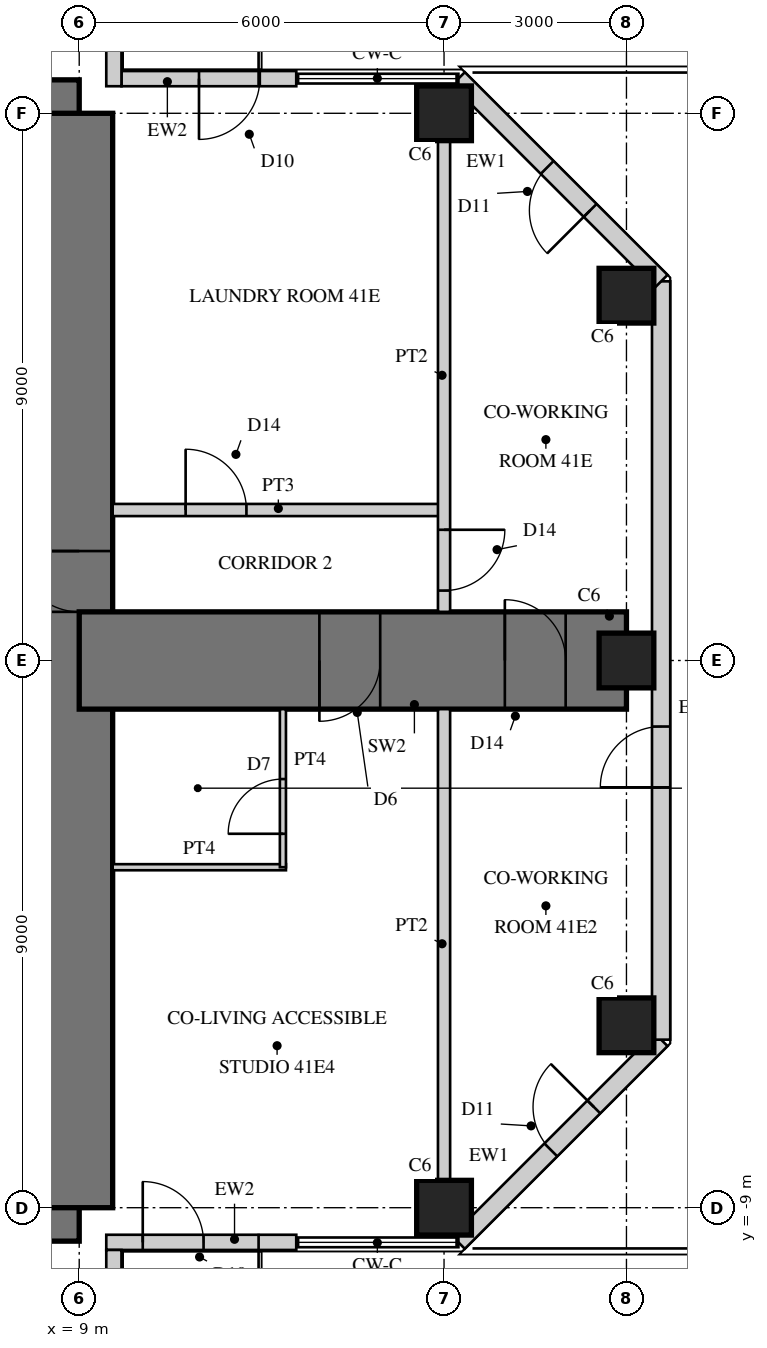
"""IFC4 building model, lengths in metres.
Left out: names, types, materials, properties, quantities, classifications, styles, units other than length and angle.
Written with IfcOpenShell. Run it as: python <this file> out.ifc"""

import sys

from ifc_helpers import new_model, si_unit, direction, frame, frame_2d, origin, origin_2d, place, context, subcontext, project, spatial, rectangle, hollow_rectangle, extrude, element, fill, save


model = new_model("IFC4")
c1 = context("Model", 3, precision=1e-05, world=origin(), true_north=direction((0.0, 1.0)))
c2 = subcontext(c1, "Body", "Model", "MODEL_VIEW")
j1 = project(units=[si_unit("LENGTHUNIT", "METRE"), si_unit("PLANEANGLEUNIT", "RADIAN")], contexts=[c1])
p1 = place(None, origin())
s1 = spatial("IfcSite", under=j1, at=p1, CompositionType="ELEMENT")
p2 = place(p1, origin())
s2 = spatial("IfcBuilding", under=s1, at=p2, CompositionType="ELEMENT")
p3 = place(p2, frame((0.0, 0.0, 169.5)))
s3 = spatial("IfcBuildingStorey", under=s2, at=p3, CompositionType="ELEMENT", Elevation=169.5)
p4 = place(p3, frame((9.0, 9.0, 0.0), z_axis=(0.0, 0.0, 1.0), x_axis=(-1.0, 0.0, 0.0)))
e1 = element("IfcWall", 1, at=p4, inside=s3, PredefinedType="SHEAR", context=c2, shape_type="SweptSolid", body=[
    extrude(rectangle(XDim=18.0, YDim=1.1, at=frame_2d((9.0, 0.0))), origin(), (0.0, 0.0, 1.0), 3.4),
])
p5 = place(p4, frame((9.8, 0.0, 0.0)))
e2 = element("IfcOpeningElement", 2, at=p5, cuts=e1, PredefinedType="OPENING", context=c2, shape_type="SweptSolid", body=[
    extrude(rectangle(XDim=1.0, YDim=2.4, at=frame_2d((0.5, 1.2))), frame((0.0, 0.56, 0.0), z_axis=(0.0, -1.0, 0.0), x_axis=(1.0, 0.0, 0.0)), (0.0, 0.0, 1.0), 1.12),
])
p6 = place(p3, frame((-9.0, -9.0, 0.0), z_axis=(0.0, 0.0, 1.0), x_axis=(1.0, 0.0, 0.0)))
e3 = element("IfcWall", 3, at=p6, inside=s3, PredefinedType="SHEAR", context=c2, shape_type="SweptSolid", body=[
    extrude(rectangle(XDim=18.0, YDim=1.1, at=frame_2d((9.0, 0.0))), origin(), (0.0, 0.0, 1.0), 3.4),
])
p7 = place(p6, frame((9.8, 0.0, 0.0)))
e4 = element("IfcOpeningElement", 4, at=p7, cuts=e3, PredefinedType="OPENING", context=c2, shape_type="SweptSolid", body=[
    extrude(rectangle(XDim=1.0, YDim=2.4, at=frame_2d((0.5, 1.2))), frame((0.0, 0.56, 0.0), z_axis=(0.0, -1.0, 0.0), x_axis=(1.0, 0.0, 0.0)), (0.0, 0.0, 1.0), 1.12),
])
p8 = place(p3, frame((9.0, -9.0, 0.0), z_axis=(0.0, 0.0, 1.0), x_axis=(0.0, 1.0, 0.0)))
e5 = element("IfcWall", 5, at=p8, inside=s3, PredefinedType="SHEAR", context=c2, shape_type="SweptSolid", body=[
    extrude(rectangle(XDim=18.0, YDim=1.1, at=frame_2d((9.0, 0.0))), origin(), (0.0, 0.0, 1.0), 3.4),
])
p9 = place(p8, frame((9.8, 0.0, 0.0)))
e6 = element("IfcOpeningElement", 6, at=p9, cuts=e5, PredefinedType="OPENING", context=c2, shape_type="SweptSolid", body=[
    extrude(rectangle(XDim=1.0, YDim=2.4, at=frame_2d((0.5, 1.2))), frame((0.0, 0.56, 0.0), z_axis=(0.0, -1.0, 0.0), x_axis=(1.0, 0.0, 0.0)), (0.0, 0.0, 1.0), 1.12),
])
p10 = place(p3, frame((9.0, 0.0, 0.0), z_axis=(0.0, 0.0, 1.0), x_axis=(1.0, 0.0, 0.0)))
e7 = element("IfcWall", 7, at=p10, inside=s3, PredefinedType="SHEAR", context=c2, shape_type="SweptSolid", body=[
    extrude(rectangle(XDim=9.0, YDim=1.6, at=frame_2d((4.5, 0.0))), origin(), (0.0, 0.0, 1.0), 3.4),
])
p11 = place(p10, frame((3.95, 0.0, 0.0)))
e8 = element("IfcOpeningElement", 8, at=p11, cuts=e7, PredefinedType="OPENING", context=c2, shape_type="SweptSolid", body=[
    extrude(rectangle(XDim=1.0, YDim=2.15, at=frame_2d((0.5, 1.075))), frame((0.0, 0.81, 0.0), z_axis=(0.0, -1.0, 0.0), x_axis=(1.0, 0.0, 0.0)), (0.0, 0.0, 1.0), 1.62),
])
p12 = place(p10, frame((7.0, 0.0, 0.0)))
e9 = element("IfcOpeningElement", 9, at=p12, cuts=e7, PredefinedType="OPENING", context=c2, shape_type="SweptSolid", body=[
    extrude(rectangle(XDim=1.0, YDim=2.2, at=frame_2d((0.5, 1.1))), frame((0.0, 0.81, 0.0), z_axis=(0.0, -1.0, 0.0), x_axis=(1.0, 0.0, 0.0)), (0.0, 0.0, 1.0), 1.62),
])
for number, where, z_axis, x_axis in (
    (10, (15.0, -9.0, 0.0), (0.0, 0.0, 1.0), (1.0, 0.0, 0.0)),
    (11, (15.0, 9.0, 0.0), (0.0, 0.0, 1.0), (1.0, 0.0, 0.0)),
    (12, (18.0, -6.0, 0.0), (0.0, 0.0, 1.0), (1.0, 0.0, 0.0)),
    (13, (18.0, 0.0, 0.0), (0.0, 0.0, 1.0), (1.0, 0.0, 0.0)),
    (14, (18.0, 6.0, 0.0), (0.0, 0.0, 1.0), (1.0, 0.0, 0.0)),
):
    element("IfcColumn", number, at=place(p3, frame(where, z_axis=z_axis, x_axis=x_axis)), inside=s3, PredefinedType="COLUMN", context=c2, shape_type="SweptSolid", body=[
        extrude(rectangle(XDim=0.9, YDim=0.9, at=origin_2d()), origin(), (0.0, 0.0, 1.0), 3.4),
    ])
p13 = place(p3, frame((9.445, -9.57, 0.0), z_axis=(0.0, 0.0, 1.0), x_axis=(1.0, 0.0, 0.0)))
e15 = element("IfcWall", 15, at=p13, inside=s3, PredefinedType="SOLIDWALL", context=c2, shape_type="SweptSolid", body=[
    extrude(rectangle(XDim=3.125, YDim=0.25, at=frame_2d((1.562, 0.0))), origin(), (0.0, 0.0, 1.0), 3.22),
])
p14 = place(p13, frame((0.6, 0.0, 0.0)))
e16 = element("IfcOpeningElement", 16, at=p14, cuts=e15, PredefinedType="OPENING", context=c2, shape_type="SweptSolid", body=[
    extrude(rectangle(XDim=1.0, YDim=2.2, at=frame_2d((0.5, 1.1))), frame((0.0, 0.135, 0.0), z_axis=(0.0, -1.0, 0.0), x_axis=(1.0, 0.0, 0.0)), (0.0, 0.0, 1.0), 0.27),
])
p15 = place(p3, frame((15.236, -9.57, 0.0), z_axis=(0.0, 0.0, 1.0), x_axis=(0.707106781187, 0.707106781187, 0.0)))
e17 = element("IfcWall", 17, at=p15, inside=s3, PredefinedType="SOLIDWALL", context=c2, shape_type="SweptSolid", body=[
    extrude(rectangle(XDim=4.715, YDim=0.3, at=frame_2d((2.357, 0.0))), origin(), (0.0, 0.0, 1.0), 3.22),
])
p16 = place(p15, frame((2.15, 0.0, 0.0)))
e18 = element("IfcOpeningElement", 18, at=p16, cuts=e17, PredefinedType="OPENING", context=c2, shape_type="SweptSolid", body=[
    extrude(rectangle(XDim=1.0, YDim=2.4, at=frame_2d((0.5, 1.2))), frame((0.0, 0.16, 0.0), z_axis=(0.0, -1.0, 0.0), x_axis=(1.0, 0.0, 0.0)), (0.0, 0.0, 1.0), 0.32),
])
p17 = place(p3, frame((18.57, -6.236, 0.0), z_axis=(0.0, 0.0, 1.0), x_axis=(0.0, 1.0, 0.0)))
e19 = element("IfcWall", 19, at=p17, inside=s3, PredefinedType="SOLIDWALL", context=c2, shape_type="SweptSolid", body=[
    extrude(rectangle(XDim=12.472, YDim=0.3, at=frame_2d((6.236, 0.0))), origin(), (0.0, 0.0, 1.0), 3.22),
])
p18 = place(p17, frame((4.15, 0.0, 0.0)))
e20 = element("IfcOpeningElement", 20, at=p18, cuts=e19, PredefinedType="OPENING", context=c2, shape_type="SweptSolid", body=[
    extrude(rectangle(XDim=1.0, YDim=2.4, at=frame_2d((0.5, 1.2))), frame((0.0, 0.16, 0.0), z_axis=(0.0, -1.0, 0.0), x_axis=(1.0, 0.0, 0.0)), (0.0, 0.0, 1.0), 0.32),
])
p19 = place(p3, frame((18.57, 6.236, 0.0), z_axis=(0.0, 0.0, 1.0), x_axis=(-0.707106781187, 0.707106781187, 0.0)))
e21 = element("IfcWall", 21, at=p19, inside=s3, PredefinedType="SOLIDWALL", context=c2, shape_type="SweptSolid", body=[
    extrude(rectangle(XDim=4.715, YDim=0.3, at=frame_2d((2.357, 0.0))), origin(), (0.0, 0.0, 1.0), 3.22),
])
p20 = place(p19, frame((1.65, 0.0, 0.0)))
e22 = element("IfcOpeningElement", 22, at=p20, cuts=e21, PredefinedType="OPENING", context=c2, shape_type="SweptSolid", body=[
    extrude(rectangle(XDim=1.0, YDim=2.4, at=frame_2d((0.5, 1.2))), frame((0.0, 0.16, 0.0), z_axis=(0.0, -1.0, 0.0), x_axis=(1.0, 0.0, 0.0)), (0.0, 0.0, 1.0), 0.32),
])
p21 = place(p3, frame((12.57, 9.57, 0.0), z_axis=(0.0, 0.0, 1.0), x_axis=(-1.0, 0.0, 0.0)))
e23 = element("IfcWall", 23, at=p21, inside=s3, PredefinedType="SOLIDWALL", context=c2, shape_type="SweptSolid", body=[
    extrude(rectangle(XDim=2.875, YDim=0.25, at=frame_2d((1.438, 0.0))), origin(), (0.0, 0.0, 1.0), 3.22),
])
p22 = place(p21, frame((0.6, 0.0, 0.0)))
e24 = element("IfcOpeningElement", 24, at=p22, cuts=e23, PredefinedType="OPENING", context=c2, shape_type="SweptSolid", body=[
    extrude(rectangle(XDim=1.0, YDim=2.2, at=frame_2d((0.5, 1.1))), frame((0.0, 0.135, 0.0), z_axis=(0.0, -1.0, 0.0), x_axis=(1.0, 0.0, 0.0)), (0.0, 0.0, 1.0), 0.27),
])
p23 = place(p3, frame((9.57, 9.445, 0.0), z_axis=(0.0, 0.0, 1.0), x_axis=(0.0, 1.0, 0.0)))
e25 = element("IfcWall", 25, at=p23, inside=s3, PredefinedType="SOLIDWALL", context=c2, shape_type="SweptSolid", body=[
    extrude(rectangle(XDim=3.125, YDim=0.25, at=frame_2d((1.562, 0.0))), origin(), (0.0, 0.0, 1.0), 3.22),
])
p24 = place(p23, frame((0.6, 0.0, 0.0)))
e26 = element("IfcOpeningElement", 26, at=p24, cuts=e25, PredefinedType="OPENING", context=c2, shape_type="SweptSolid", body=[
    extrude(rectangle(XDim=1.0, YDim=2.2, at=frame_2d((0.5, 1.1))), frame((0.0, 0.135, 0.0), z_axis=(0.0, -1.0, 0.0), x_axis=(1.0, 0.0, 0.0)), (0.0, 0.0, 1.0), 0.27),
])
p25 = place(p3, frame((9.57, -12.57, 0.0), z_axis=(0.0, 0.0, 1.0), x_axis=(0.0, 1.0, 0.0)))
e27 = element("IfcWall", 27, at=p25, inside=s3, PredefinedType="SOLIDWALL", context=c2, shape_type="SweptSolid", body=[
    extrude(rectangle(XDim=2.875, YDim=0.25, at=frame_2d((1.438, 0.0))), origin(), (0.0, 0.0, 1.0), 3.22),
])
p26 = place(p25, frame((0.6, 0.0, 0.0)))
e28 = element("IfcOpeningElement", 28, at=p26, cuts=e27, PredefinedType="OPENING", context=c2, shape_type="SweptSolid", body=[
    extrude(rectangle(XDim=1.0, YDim=2.2, at=frame_2d((0.5, 1.1))), frame((0.0, 0.135, 0.0), z_axis=(0.0, -1.0, 0.0), x_axis=(1.0, 0.0, 0.0)), (0.0, 0.0, 1.0), 0.27),
])
p27 = place(p3, frame((9.55, -3.4, 0.0), z_axis=(0.0, 0.0, 1.0), x_axis=(1.0, 0.0, 0.0)))
e29 = element("IfcWall", 29, at=p27, inside=s3, PredefinedType="PARTITIONING", context=c2, shape_type="SweptSolid", body=[
    extrude(rectangle(XDim=2.85, YDim=0.1, at=frame_2d((1.425, 0.0))), origin(), (0.0, 0.0, 1.0), 3.22),
])
p28 = place(p3, frame((12.35, -3.4, 0.0), z_axis=(0.0, 0.0, 1.0), x_axis=(0.0, 1.0, 0.0)))
e30 = element("IfcWall", 30, at=p28, inside=s3, PredefinedType="PARTITIONING", context=c2, shape_type="SweptSolid", body=[
    extrude(rectangle(XDim=2.6, YDim=0.1, at=frame_2d((1.3, 0.0))), origin(), (0.0, 0.0, 1.0), 3.22),
])
p29 = place(p28, frame((0.55, 0.0, 0.0)))
e31 = element("IfcOpeningElement", 31, at=p29, cuts=e30, PredefinedType="OPENING", context=c2, shape_type="SweptSolid", body=[
    extrude(rectangle(XDim=0.9, YDim=2.1, at=frame_2d((0.45, 1.05))), frame((0.0, 0.06, 0.0), z_axis=(0.0, -1.0, 0.0), x_axis=(1.0, 0.0, 0.0)), (0.0, 0.0, 1.0), 0.12),
])
p30 = place(p3, frame((9.55, 2.475, 0.0), z_axis=(0.0, 0.0, 1.0), x_axis=(1.0, 0.0, 0.0)))
e32 = element("IfcWall", 32, at=p30, inside=s3, PredefinedType="SOLIDWALL", context=c2, shape_type="SweptSolid", body=[
    extrude(rectangle(XDim=5.45, YDim=0.2, at=frame_2d((2.725, 0.0))), origin(), (0.0, 0.0, 1.0), 3.22),
])
p31 = place(p30, frame((1.2, 0.0, 0.0)))
e33 = element("IfcOpeningElement", 33, at=p31, cuts=e32, PredefinedType="OPENING", context=c2, shape_type="SweptSolid", body=[
    extrude(rectangle(XDim=1.0, YDim=2.2, at=frame_2d((0.5, 1.1))), frame((0.0, 0.11, 0.0), z_axis=(0.0, -1.0, 0.0), x_axis=(1.0, 0.0, 0.0)), (0.0, 0.0, 1.0), 0.22),
])
p32 = place(p3, frame((15.0, -8.55, 0.0), z_axis=(0.0, 0.0, 1.0), x_axis=(0.0, 1.0, 0.0)))
e34 = element("IfcWall", 34, at=p32, inside=s3, PredefinedType="SOLIDWALL", context=c2, shape_type="SweptSolid", body=[
    extrude(rectangle(XDim=7.75, YDim=0.2, at=frame_2d((3.875, 0.0))), origin(), (0.0, 0.0, 1.0), 2.47),
])
p33 = place(p3, frame((15.0, 0.8, 0.0), z_axis=(0.0, 0.0, 1.0), x_axis=(0.0, 1.0, 0.0)))
e35 = element("IfcWall", 35, at=p33, inside=s3, PredefinedType="SOLIDWALL", context=c2, shape_type="SweptSolid", body=[
    extrude(rectangle(XDim=7.75, YDim=0.2, at=frame_2d((3.875, 0.0))), origin(), (0.0, 0.0, 1.0), 2.47),
])
p34 = place(p33, frame((0.35, 0.0, 0.0)))
e36 = element("IfcOpeningElement", 36, at=p34, cuts=e35, PredefinedType="OPENING", context=c2, shape_type="SweptSolid", body=[
    extrude(rectangle(XDim=1.0, YDim=2.2, at=frame_2d((0.5, 1.1))), frame((0.0, 0.11, 0.0), z_axis=(0.0, -1.0, 0.0), x_axis=(1.0, 0.0, 0.0)), (0.0, 0.0, 1.0), 0.22),
])
p35 = place(p14, origin())
e37 = element("IfcDoor", 37, at=p35, inside=s3, OperationType="SINGLE_SWING_LEFT", PredefinedType="DOOR", context=c2, shape_type="SweptSolid", body=[
    extrude(hollow_rectangle(XDim=1.0, YDim=2.2, WallThickness=0.06, at=frame_2d((0.5, 1.1))), frame((0.0, 0.025, 0.0), z_axis=(0.0, -1.0, 0.0), x_axis=(1.0, 0.0, 0.0)), (0.0, 0.0, 1.0), 0.05),
    extrude(rectangle(XDim=0.879, YDim=2.079, at=frame_2d((0.5, 1.1))), frame((0.0, 0.025, 0.0), z_axis=(0.0, -1.0, 0.0), x_axis=(1.0, 0.0, 0.0)), (0.0, 0.0, 1.0), 0.05),
])
fill(e16, e37)
p36 = place(p16, origin())
e38 = element("IfcDoor", 38, at=p36, inside=s3, OperationType="SINGLE_SWING_RIGHT", PredefinedType="DOOR", context=c2, shape_type="SweptSolid", body=[
    extrude(hollow_rectangle(XDim=1.0, YDim=2.4, WallThickness=0.06, at=frame_2d((0.5, 1.2))), frame((0.0, 0.025, 0.0), z_axis=(0.0, -1.0, 0.0), x_axis=(1.0, 0.0, 0.0)), (0.0, 0.0, 1.0), 0.05),
    extrude(rectangle(XDim=0.879, YDim=2.279, at=frame_2d((0.5, 1.2))), frame((0.0, 0.025, 0.0), z_axis=(0.0, -1.0, 0.0), x_axis=(1.0, 0.0, 0.0)), (0.0, 0.0, 1.0), 0.05),
])
fill(e18, e38)
p37 = place(p18, origin())
e39 = element("IfcDoor", 39, at=p37, inside=s3, OperationType="SINGLE_SWING_LEFT", PredefinedType="DOOR", context=c2, shape_type="SweptSolid", body=[
    extrude(hollow_rectangle(XDim=1.0, YDim=2.4, WallThickness=0.06, at=frame_2d((0.5, 1.2))), frame((0.0, 0.025, 0.0), z_axis=(0.0, -1.0, 0.0), x_axis=(1.0, 0.0, 0.0)), (0.0, 0.0, 1.0), 0.05),
    extrude(rectangle(XDim=0.879, YDim=2.279, at=frame_2d((0.5, 1.2))), frame((0.0, 0.025, 0.0), z_axis=(0.0, -1.0, 0.0), x_axis=(1.0, 0.0, 0.0)), (0.0, 0.0, 1.0), 0.05),
])
fill(e20, e39)
p38 = place(p20, origin())
e40 = element("IfcDoor", 40, at=p38, inside=s3, OperationType="SINGLE_SWING_LEFT", PredefinedType="DOOR", context=c2, shape_type="SweptSolid", body=[
    extrude(hollow_rectangle(XDim=1.0, YDim=2.4, WallThickness=0.06, at=frame_2d((0.5, 1.2))), frame((0.0, 0.025, 0.0), z_axis=(0.0, -1.0, 0.0), x_axis=(1.0, 0.0, 0.0)), (0.0, 0.0, 1.0), 0.05),
    extrude(rectangle(XDim=0.879, YDim=2.279, at=frame_2d((0.5, 1.2))), frame((0.0, 0.025, 0.0), z_axis=(0.0, -1.0, 0.0), x_axis=(1.0, 0.0, 0.0)), (0.0, 0.0, 1.0), 0.05),
])
fill(e22, e40)
p39 = place(p22, origin())
e41 = element("IfcDoor", 41, at=p39, inside=s3, OperationType="SINGLE_SWING_RIGHT", PredefinedType="DOOR", context=c2, shape_type="SweptSolid", body=[
    extrude(hollow_rectangle(XDim=1.0, YDim=2.2, WallThickness=0.06, at=frame_2d((0.5, 1.1))), frame((0.0, 0.025, 0.0), z_axis=(0.0, -1.0, 0.0), x_axis=(1.0, 0.0, 0.0)), (0.0, 0.0, 1.0), 0.05),
    extrude(rectangle(XDim=0.879, YDim=2.079, at=frame_2d((0.5, 1.1))), frame((0.0, 0.025, 0.0), z_axis=(0.0, -1.0, 0.0), x_axis=(1.0, 0.0, 0.0)), (0.0, 0.0, 1.0), 0.05),
])
fill(e24, e41)
p40 = place(p29, origin())
e42 = element("IfcDoor", 42, at=p40, inside=s3, OperationType="SINGLE_SWING_LEFT", PredefinedType="DOOR", context=c2, shape_type="SweptSolid", body=[
    extrude(rectangle(XDim=0.9, YDim=2.1, at=frame_2d((0.45, 1.05))), frame((0.0, 0.025, 0.0), z_axis=(0.0, -1.0, 0.0), x_axis=(1.0, 0.0, 0.0)), (0.0, 0.0, 1.0), 0.05),
])
fill(e31, e42)
p41 = place(p31, origin())
e43 = element("IfcDoor", 43, at=p41, inside=s3, OperationType="SINGLE_SWING_LEFT", PredefinedType="DOOR", context=c2, shape_type="SweptSolid", body=[
    extrude(rectangle(XDim=1.0, YDim=2.2, at=frame_2d((0.5, 1.1))), frame((0.0, 0.025, 0.0), z_axis=(0.0, -1.0, 0.0), x_axis=(1.0, 0.0, 0.0)), (0.0, 0.0, 1.0), 0.05),
])
fill(e33, e43)
p42 = place(p34, frame((1.0, 0.0, 0.0), z_axis=(0.0, 0.0, 1.0), x_axis=(-1.0, 0.0, 0.0)))
e44 = element("IfcDoor", 44, at=p42, inside=s3, OperationType="SINGLE_SWING_LEFT", PredefinedType="DOOR", context=c2, shape_type="SweptSolid", body=[
    extrude(rectangle(XDim=1.0, YDim=2.2, at=frame_2d((0.5, 1.1))), frame((0.0, 0.025, 0.0), z_axis=(0.0, -1.0, 0.0), x_axis=(1.0, 0.0, 0.0)), (0.0, 0.0, 1.0), 0.05),
])
fill(e36, e44)
p43 = place(p11, frame((1.0, 0.0, 0.0), z_axis=(0.0, 0.0, 1.0), x_axis=(-1.0, 0.0, 0.0)))
e45 = element("IfcDoor", 45, at=p43, inside=s3, OperationType="SINGLE_SWING_RIGHT", PredefinedType="DOOR", context=c2, shape_type="SweptSolid", body=[
    extrude(rectangle(XDim=1.0, YDim=2.15, at=frame_2d((0.5, 1.075))), frame((0.0, 0.025, 0.0), z_axis=(0.0, -1.0, 0.0), x_axis=(1.0, 0.0, 0.0)), (0.0, 0.0, 1.0), 0.05),
])
fill(e8, e45)
p44 = place(p12, origin())
e46 = element("IfcDoor", 46, at=p44, inside=s3, OperationType="SINGLE_SWING_LEFT", PredefinedType="DOOR", context=c2, shape_type="SweptSolid", body=[
    extrude(rectangle(XDim=1.0, YDim=2.2, at=frame_2d((0.5, 1.1))), frame((0.0, 0.025, 0.0), z_axis=(0.0, -1.0, 0.0), x_axis=(1.0, 0.0, 0.0)), (0.0, 0.0, 1.0), 0.05),
])
fill(e9, e46)
p45 = place(p9, origin())
e47 = element("IfcDoor", 47, at=p45, inside=s3, OperationType="SINGLE_SWING_RIGHT", PredefinedType="DOOR", context=c2, shape_type="SweptSolid", body=[
    extrude(rectangle(XDim=1.0, YDim=2.4, at=frame_2d((0.5, 1.2))), frame((0.0, 0.055, 0.0), z_axis=(0.0, -1.0, 0.0), x_axis=(1.0, 0.0, 0.0)), (0.0, 0.0, 1.0), 0.05),
])
fill(e6, e47)
save(model, sys.argv[1])
